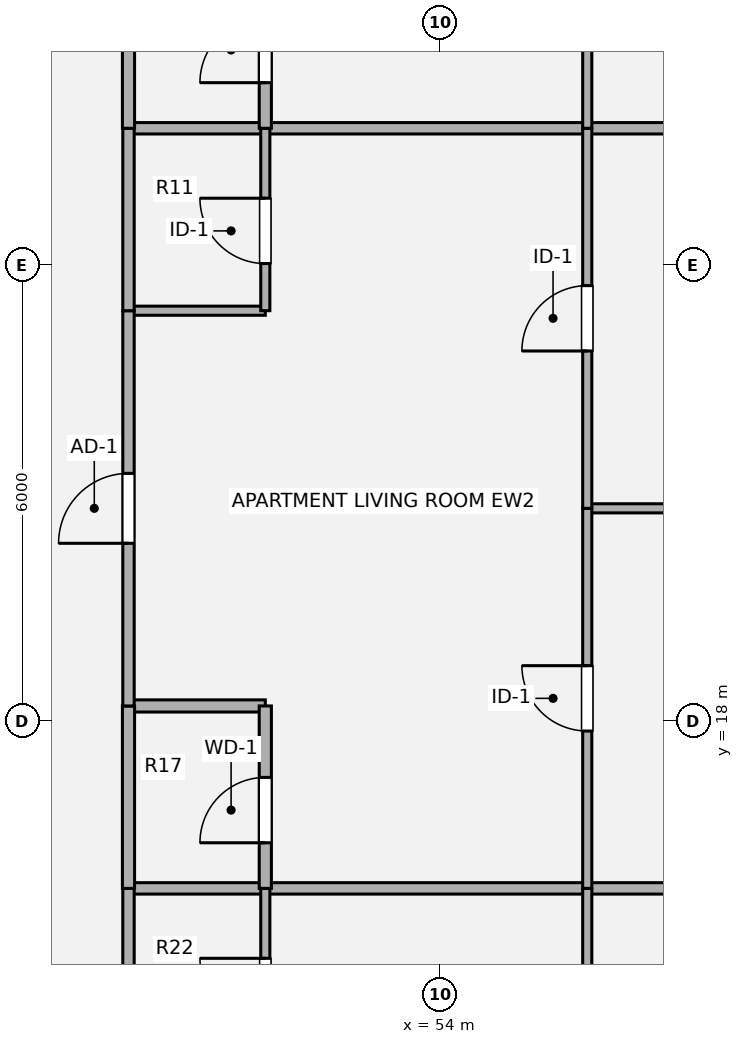
"""IFC4 building model, lengths in metres.
Left out: names, types, materials, properties, quantities, classifications, styles, units other than length and angle.
Written with IfcOpenShell. Run it as: python <this file> out.ifc"""

import sys

from ifc_helpers import new_model, si_unit, direction, frame, frame_2d, origin, origin_2d, place, context, subcontext, project, spatial, rectangle, extrude, source, transform, mapped, element, fill, save


model = new_model("IFC4")
c1 = context("Model", 3, precision=1e-05, world=origin(), true_north=direction((0.0, 1.0)))
c2 = subcontext(c1, "Body", "Model", "MODEL_VIEW")
j1 = project(units=[si_unit("LENGTHUNIT", "METRE"), si_unit("PLANEANGLEUNIT", "RADIAN")], contexts=[c1])
p1 = place(None, origin())
s1 = spatial("IfcSite", under=j1, at=p1, CompositionType="ELEMENT")
p2 = place(p1, origin())
s2 = spatial("IfcBuilding", under=s1, at=p2, CompositionType="ELEMENT")
p3 = place(p2, frame((0.0, 0.0, 72.36)))
s3 = spatial("IfcBuildingStorey", under=s2, at=p3, CompositionType="ELEMENT", Elevation=72.36)
p4 = place(p3, frame((49.9, 15.8, 0.0), z_axis=(0.0, 0.0, 1.0), x_axis=(1.0, 0.0, 0.0)))
e1 = element("IfcWall", 1, at=p4, inside=s3, PredefinedType="PARTITIONING", context=c2, shape_type="SweptSolid", body=[
    extrude(rectangle(XDim=10.02, YDim=0.15, at=frame_2d((5.01, 0.0))), origin(), (0.0, 0.0, 1.0), 3.5),
])
p5 = place(p3, frame((49.9, 18.2, 0.0), z_axis=(0.0, 0.0, 1.0), x_axis=(1.0, 0.0, 0.0)))
e2 = element("IfcWall", 2, at=p5, inside=s3, PredefinedType="PLUMBINGWALL", context=c2, shape_type="SweptSolid", body=[
    extrude(rectangle(XDim=1.8, YDim=0.16, at=frame_2d((0.9, 0.0))), origin(), (0.0, 0.0, 1.0), 2.715),
])
p6 = place(p3, frame((55.936, 20.8, 0.0), z_axis=(0.0, 0.0, 1.0), x_axis=(1.0, 0.0, 0.0)))
e3 = element("IfcWall", 3, at=p6, inside=s3, PredefinedType="PARTITIONING", context=c2, shape_type="SweptSolid", body=[
    extrude(rectangle(XDim=3.984, YDim=0.12, at=frame_2d((1.992, 0.0))), origin(), (0.0, 0.0, 1.0), 3.055),
])
p7 = place(p3, frame((49.9, 23.4, 0.0), z_axis=(0.0, 0.0, 1.0), x_axis=(1.0, 0.0, 0.0)))
e4 = element("IfcWall", 4, at=p7, inside=s3, PredefinedType="PARTITIONING", context=c2, shape_type="SweptSolid", body=[
    extrude(rectangle(XDim=1.8, YDim=0.12, at=frame_2d((0.9, 0.0))), origin(), (0.0, 0.0, 1.0), 2.982),
])
p8 = place(p3, frame((49.9, 25.8, 0.0), z_axis=(0.0, 0.0, 1.0), x_axis=(1.0, 0.0, 0.0)))
e5 = element("IfcWall", 5, at=p8, inside=s3, PredefinedType="PARTITIONING", context=c2, shape_type="SweptSolid", body=[
    extrude(rectangle(XDim=10.02, YDim=0.15, at=frame_2d((5.01, 0.0))), origin(), (0.0, 0.0, 1.0), 2.982),
])
p9 = place(p3, frame((49.9, 13.4, 0.0), z_axis=(0.0, 0.0, 1.0), x_axis=(0.0, 1.0, 0.0)))
e6 = element("IfcWall", 6, at=p9, inside=s3, PredefinedType="PARTITIONING", context=c2, shape_type="SweptSolid", body=[
    extrude(rectangle(XDim=2.4, YDim=0.15, at=frame_2d((1.2, 0.0))), origin(), (0.0, 0.0, 1.0), 3.5),
])
p10 = place(p3, frame((49.9, 15.8, 0.0), z_axis=(0.0, 0.0, 1.0), x_axis=(0.0, 1.0, 0.0)))
e7 = element("IfcWall", 7, at=p10, inside=s3, PredefinedType="PLUMBINGWALL", context=c2, shape_type="SweptSolid", body=[
    extrude(rectangle(XDim=2.4, YDim=0.16, at=frame_2d((1.2, 0.0))), origin(), (0.0, 0.0, 1.0), 3.5),
])
p11 = place(p3, frame((49.9, 18.2, 0.0), z_axis=(0.0, 0.0, 1.0), x_axis=(0.0, 1.0, 0.0)))
e8 = element("IfcWall", 8, at=p11, inside=s3, PredefinedType="PARTITIONING", context=c2, shape_type="SweptSolid", body=[
    extrude(rectangle(XDim=5.2, YDim=0.15, at=frame_2d((2.6, 0.0))), origin(), (0.0, 0.0, 1.0), 3.5),
])
p12 = place(p11, frame((2.14, 0.0, 0.0)))
e9 = element("IfcOpeningElement", 9, at=p12, cuts=e8, PredefinedType="OPENING", context=c2, shape_type="SweptSolid", body=[
    extrude(rectangle(XDim=0.92, YDim=2.1, at=origin_2d()), frame((0.46, 0.085, 1.05), z_axis=(0.0, -1.0, 0.0), x_axis=(1.0, 0.0, 0.0)), (0.0, 0.0, 1.0), 0.17),
])
p13 = place(p3, frame((49.9, 23.4, 0.0), z_axis=(0.0, 0.0, 1.0), x_axis=(0.0, 1.0, 0.0)))
e10 = element("IfcWall", 10, at=p13, inside=s3, PredefinedType="PARTITIONING", context=c2, shape_type="SweptSolid", body=[
    extrude(rectangle(XDim=2.4, YDim=0.15, at=frame_2d((1.2, 0.0))), origin(), (0.0, 0.0, 1.0), 3.5),
])
p14 = place(p3, frame((49.9, 25.8, 0.0), z_axis=(0.0, 0.0, 1.0), x_axis=(0.0, 1.0, 0.0)))
e11 = element("IfcWall", 11, at=p14, inside=s3, PredefinedType="PLUMBINGWALL", context=c2, shape_type="SweptSolid", body=[
    extrude(rectangle(XDim=2.4, YDim=0.16, at=frame_2d((1.2, 0.0))), origin(), (0.0, 0.0, 1.0), 3.5),
])
p15 = place(p3, frame((51.7, 13.4, 0.0), z_axis=(0.0, 0.0, 1.0), x_axis=(0.0, 1.0, 0.0)))
e12 = element("IfcWall", 12, at=p15, inside=s3, PredefinedType="PARTITIONING", context=c2, shape_type="SweptSolid", body=[
    extrude(rectangle(XDim=2.4, YDim=0.12, at=frame_2d((1.2, 0.0))), origin(), (0.0, 0.0, 1.0), 3.5),
])
p16 = place(p15, frame((0.62, 0.0, 0.0)))
e13 = element("IfcOpeningElement", 13, at=p16, cuts=e12, PredefinedType="OPENING", context=c2, shape_type="SweptSolid", body=[
    extrude(rectangle(XDim=0.86, YDim=2.1, at=origin_2d()), frame((0.43, 0.07, 1.05), z_axis=(0.0, -1.0, 0.0), x_axis=(1.0, 0.0, 0.0)), (0.0, 0.0, 1.0), 0.14),
])
p17 = place(p3, frame((51.7, 15.8, 0.0), z_axis=(0.0, 0.0, 1.0), x_axis=(0.0, 1.0, 0.0)))
e14 = element("IfcWall", 14, at=p17, inside=s3, PredefinedType="PLUMBINGWALL", context=c2, shape_type="SweptSolid", body=[
    extrude(rectangle(XDim=2.4, YDim=0.16, at=frame_2d((1.2, 0.0))), origin(), (0.0, 0.0, 1.0), 3.5),
])
p18 = place(p17, frame((0.6, 0.0, 0.0)))
e15 = element("IfcOpeningElement", 15, at=p18, cuts=e14, PredefinedType="OPENING", context=c2, shape_type="SweptSolid", body=[
    extrude(rectangle(XDim=0.86, YDim=2.1, at=origin_2d()), frame((0.43, 0.09, 1.05), z_axis=(0.0, -1.0, 0.0), x_axis=(1.0, 0.0, 0.0)), (0.0, 0.0, 1.0), 0.18),
])
p19 = place(p3, frame((51.7, 23.4, 0.0), z_axis=(0.0, 0.0, 1.0), x_axis=(0.0, 1.0, 0.0)))
e16 = element("IfcWall", 16, at=p19, inside=s3, PredefinedType="PARTITIONING", context=c2, shape_type="SweptSolid", body=[
    extrude(rectangle(XDim=2.4, YDim=0.12, at=frame_2d((1.2, 0.0))), origin(), (0.0, 0.0, 1.0), 3.5),
])
p20 = place(p19, frame((0.62, 0.0, 0.0)))
e17 = element("IfcOpeningElement", 17, at=p20, cuts=e16, PredefinedType="OPENING", context=c2, shape_type="SweptSolid", body=[
    extrude(rectangle(XDim=0.86, YDim=2.1, at=origin_2d()), frame((0.43, 0.07, 1.05), z_axis=(0.0, -1.0, 0.0), x_axis=(1.0, 0.0, 0.0)), (0.0, 0.0, 1.0), 0.14),
])
p21 = place(p3, frame((51.7, 25.8, 0.0), z_axis=(0.0, 0.0, 1.0), x_axis=(0.0, 1.0, 0.0)))
e18 = element("IfcWall", 18, at=p21, inside=s3, PredefinedType="PLUMBINGWALL", context=c2, shape_type="SweptSolid", body=[
    extrude(rectangle(XDim=2.4, YDim=0.16, at=frame_2d((1.2, 0.0))), origin(), (0.0, 0.0, 1.0), 3.5),
])
p22 = place(p21, frame((0.6, 0.0, 0.0)))
e19 = element("IfcOpeningElement", 19, at=p22, cuts=e18, PredefinedType="OPENING", context=c2, shape_type="SweptSolid", body=[
    extrude(rectangle(XDim=0.86, YDim=2.1, at=origin_2d()), frame((0.43, 0.09, 1.05), z_axis=(0.0, -1.0, 0.0), x_axis=(1.0, 0.0, 0.0)), (0.0, 0.0, 1.0), 0.18),
])
p23 = place(p3, frame((55.936, 10.94, 0.0), z_axis=(0.0, 0.0, 1.0), x_axis=(0.0, 1.0, 0.0)))
e20 = element("IfcWall", 20, at=p23, inside=s3, PredefinedType="PARTITIONING", context=c2, shape_type="SweptSolid", body=[
    extrude(rectangle(XDim=4.86, YDim=0.12, at=frame_2d((2.43, 0.0))), origin(), (0.0, 0.0, 1.0), 3.5),
])
p24 = place(p23, frame((2.0, 0.0, 0.0)))
e21 = element("IfcOpeningElement", 21, at=p24, cuts=e20, PredefinedType="OPENING", context=c2, shape_type="SweptSolid", body=[
    extrude(rectangle(XDim=0.86, YDim=2.1, at=origin_2d()), frame((0.43, 0.07, 1.05), z_axis=(0.0, -1.0, 0.0), x_axis=(1.0, 0.0, 0.0)), (0.0, 0.0, 1.0), 0.14),
])
p25 = place(p3, frame((55.936, 15.8, 0.0), z_axis=(0.0, 0.0, 1.0), x_axis=(0.0, 1.0, 0.0)))
e22 = element("IfcWall", 22, at=p25, inside=s3, PredefinedType="PARTITIONING", context=c2, shape_type="SweptSolid", body=[
    extrude(rectangle(XDim=5.0, YDim=0.12, at=frame_2d((2.5, 0.0))), origin(), (0.0, 0.0, 1.0), 3.5),
])
p26 = place(p25, frame((2.07, 0.0, 0.0)))
e23 = element("IfcOpeningElement", 23, at=p26, cuts=e22, PredefinedType="OPENING", context=c2, shape_type="SweptSolid", body=[
    extrude(rectangle(XDim=0.86, YDim=2.1, at=origin_2d()), frame((0.43, 0.07, 1.05), z_axis=(0.0, -1.0, 0.0), x_axis=(1.0, 0.0, 0.0)), (0.0, 0.0, 1.0), 0.14),
])
p27 = place(p3, frame((55.936, 20.8, 0.0), z_axis=(0.0, 0.0, 1.0), x_axis=(0.0, 1.0, 0.0)))
e24 = element("IfcWall", 24, at=p27, inside=s3, PredefinedType="PARTITIONING", context=c2, shape_type="SweptSolid", body=[
    extrude(rectangle(XDim=5.0, YDim=0.12, at=frame_2d((2.5, 0.0))), origin(), (0.0, 0.0, 1.0), 3.5),
])
p28 = place(p27, frame((2.07, 0.0, 0.0)))
e25 = element("IfcOpeningElement", 25, at=p28, cuts=e24, PredefinedType="OPENING", context=c2, shape_type="SweptSolid", body=[
    extrude(rectangle(XDim=0.86, YDim=2.1, at=origin_2d()), frame((0.43, 0.07, 1.05), z_axis=(0.0, -1.0, 0.0), x_axis=(1.0, 0.0, 0.0)), (0.0, 0.0, 1.0), 0.14),
])
p29 = place(p3, frame((55.936, 25.8, 0.0), z_axis=(0.0, 0.0, 1.0), x_axis=(0.0, 1.0, 0.0)))
e26 = element("IfcWall", 26, at=p29, inside=s3, PredefinedType="PARTITIONING", context=c2, shape_type="SweptSolid", body=[
    extrude(rectangle(XDim=4.86, YDim=0.12, at=frame_2d((2.43, 0.0))), origin(), (0.0, 0.0, 1.0), 3.5),
])
p30 = place(p29, frame((2.0, 0.0, 0.0)))
e27 = element("IfcOpeningElement", 27, at=p30, cuts=e26, PredefinedType="OPENING", context=c2, shape_type="SweptSolid", body=[
    extrude(rectangle(XDim=0.86, YDim=2.1, at=origin_2d()), frame((0.43, 0.07, 1.05), z_axis=(0.0, -1.0, 0.0), x_axis=(1.0, 0.0, 0.0)), (0.0, 0.0, 1.0), 0.14),
])
m1 = source(origin(), c2, "Body", "SweptSolid", [
    extrude(rectangle(XDim=0.92, YDim=2.1, at=origin_2d()), frame((0.46, 0.025, 1.05), z_axis=(0.0, -1.0, 0.0), x_axis=(1.0, 0.0, 0.0)), (0.0, 0.0, 1.0), 0.05),
])
p31 = place(p12, origin())
e28 = element("IfcDoor", 28, at=p31, inside=s3, OperationType="SINGLE_SWING_LEFT", PredefinedType="DOOR", context=c2, shape_type="MappedRepresentation", body=[
    mapped(m1, transform((0.0, 0.0, 0.0), x_axis=(1.0, 0.0, 0.0), y_axis=(0.0, 1.0, 0.0), z_axis=(0.0, 0.0, 1.0), scale=1.0)),
])
fill(e9, e28)
m2 = source(origin(), c2, "Body", "SweptSolid", [
    extrude(rectangle(XDim=0.86, YDim=2.1, at=origin_2d()), frame((0.43, 0.025, 1.05), z_axis=(0.0, -1.0, 0.0), x_axis=(1.0, 0.0, 0.0)), (0.0, 0.0, 1.0), 0.05),
])
p32 = place(p16, origin())
e29 = element("IfcDoor", 29, at=p32, inside=s3, OperationType="SINGLE_SWING_RIGHT", PredefinedType="DOOR", context=c2, shape_type="MappedRepresentation", body=[
    mapped(m2, transform((0.0, 0.0, 0.0), x_axis=(1.0, 0.0, 0.0), y_axis=(0.0, 1.0, 0.0), z_axis=(0.0, 0.0, 1.0), scale=1.0)),
])
fill(e13, e29)
m3 = source(origin(), c2, "Body", "SweptSolid", [
    extrude(rectangle(XDim=0.86, YDim=2.1, at=origin_2d()), frame((0.43, 0.025, 1.05), z_axis=(0.0, -1.0, 0.0), x_axis=(1.0, 0.0, 0.0)), (0.0, 0.0, 1.0), 0.05),
])
p33 = place(p18, origin())
e30 = element("IfcDoor", 30, at=p33, inside=s3, OperationType="SINGLE_SWING_LEFT", PredefinedType="DOOR", context=c2, shape_type="MappedRepresentation", body=[
    mapped(m3, transform((0.0, 0.0, 0.0), x_axis=(1.0, 0.0, 0.0), y_axis=(0.0, 1.0, 0.0), z_axis=(0.0, 0.0, 1.0), scale=1.0)),
])
fill(e15, e30)
p34 = place(p20, origin())
e31 = element("IfcDoor", 31, at=p34, inside=s3, OperationType="SINGLE_SWING_RIGHT", PredefinedType="DOOR", context=c2, shape_type="MappedRepresentation", body=[
    mapped(m2, transform((0.0, 0.0, 0.0), x_axis=(1.0, 0.0, 0.0), y_axis=(0.0, 1.0, 0.0), z_axis=(0.0, 0.0, 1.0), scale=1.0)),
])
fill(e17, e31)
p35 = place(p22, origin())
e32 = element("IfcDoor", 32, at=p35, inside=s3, OperationType="SINGLE_SWING_LEFT", PredefinedType="DOOR", context=c2, shape_type="MappedRepresentation", body=[
    mapped(m3, transform((0.0, 0.0, 0.0), x_axis=(1.0, 0.0, 0.0), y_axis=(0.0, 1.0, 0.0), z_axis=(0.0, 0.0, 1.0), scale=1.0)),
])
fill(e19, e32)
p36 = place(p26, origin())
e33 = element("IfcDoor", 33, at=p36, inside=s3, OperationType="SINGLE_SWING_RIGHT", PredefinedType="DOOR", context=c2, shape_type="MappedRepresentation", body=[
    mapped(m2, transform((0.0, 0.0, 0.0), x_axis=(1.0, 0.0, 0.0), y_axis=(0.0, 1.0, 0.0), z_axis=(0.0, 0.0, 1.0), scale=1.0)),
])
fill(e23, e33)
p37 = place(p28, origin())
e34 = element("IfcDoor", 34, at=p37, inside=s3, OperationType="SINGLE_SWING_LEFT", PredefinedType="DOOR", context=c2, shape_type="MappedRepresentation", body=[
    mapped(m2, transform((0.0, 0.0, 0.0), x_axis=(1.0, 0.0, 0.0), y_axis=(0.0, 1.0, 0.0), z_axis=(0.0, 0.0, 1.0), scale=1.0)),
])
fill(e25, e34)
save(model, sys.argv[1])
